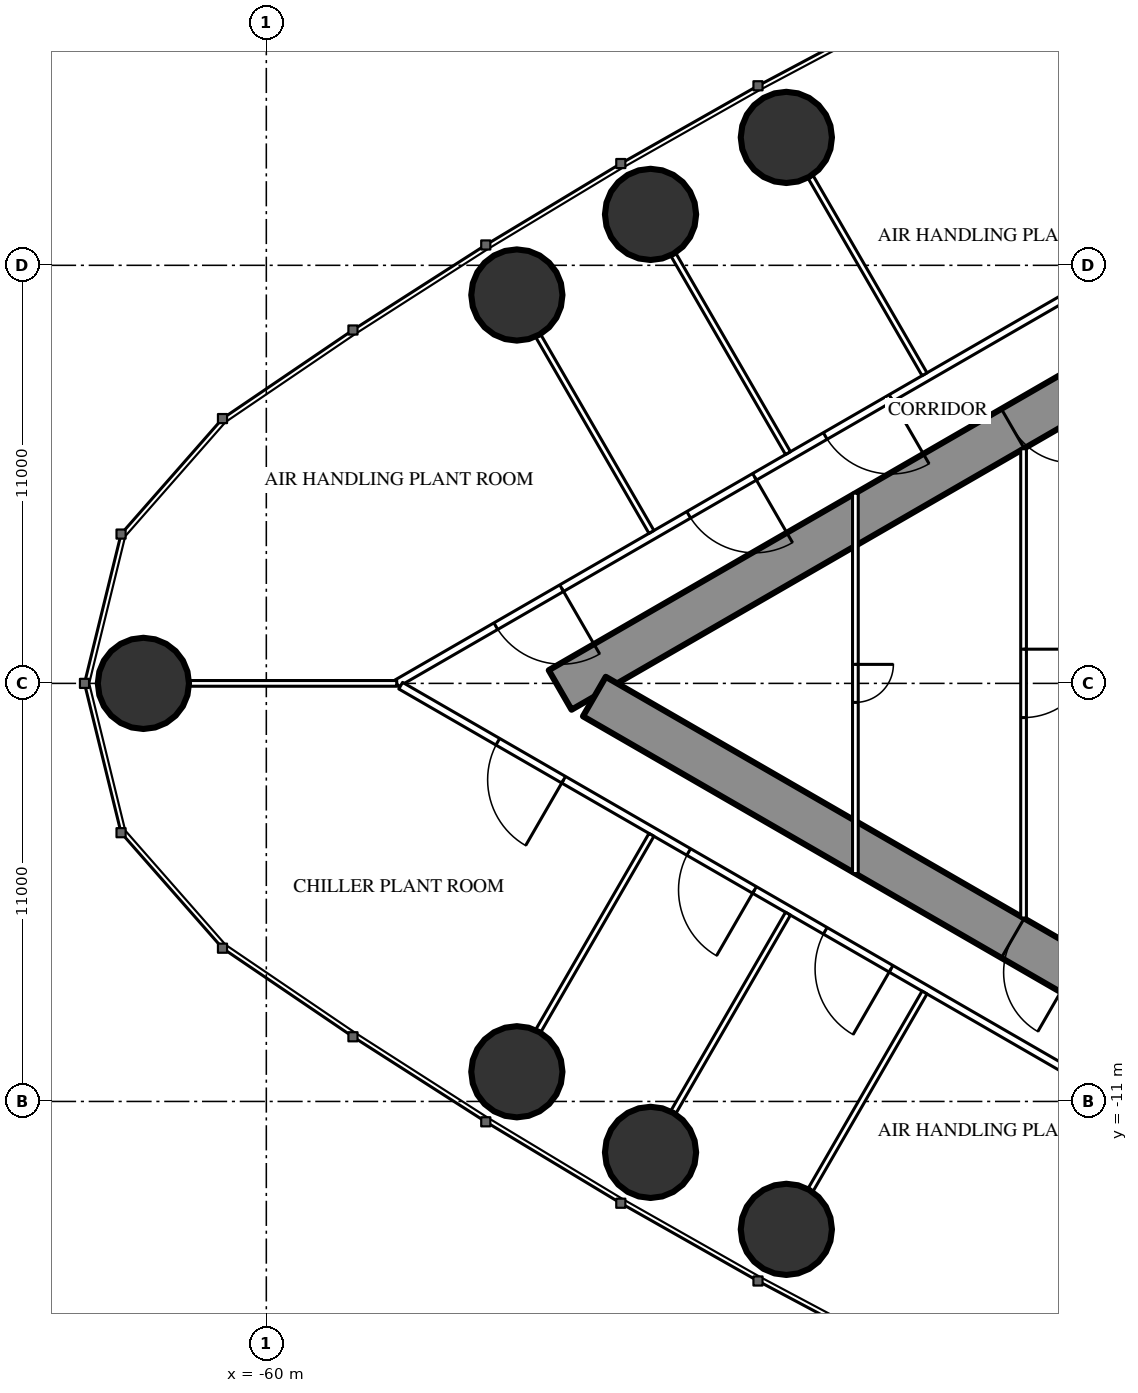
"""IFC4 building model, lengths in metres.
Left out: names, types, materials, properties, quantities, classifications, styles, units other than length and angle.
Written with IfcOpenShell. Run it as: python <this file> out.ifc"""

import sys

from ifc_helpers import new_model, si_unit, direction, frame, frame_2d, origin, origin_2d, place, context, subcontext, project, spatial, rectangle, circle, extrude, element, fill, save


model = new_model("IFC4")
c1 = context("Model", 3, precision=1e-05, world=origin(), true_north=direction((0.0, 1.0)))
c2 = subcontext(c1, "Body", "Model", "MODEL_VIEW")
j1 = project(units=[si_unit("LENGTHUNIT", "METRE"), si_unit("PLANEANGLEUNIT", "RADIAN")], contexts=[c1])
p1 = place(None, origin())
s1 = spatial("IfcSite", under=j1, at=p1, CompositionType="ELEMENT")
p2 = place(p1, origin())
s2 = spatial("IfcBuilding", under=s1, at=p2, CompositionType="ELEMENT")
p3 = place(p2, frame((0.0, 0.0, 263.3)))
s3 = spatial("IfcBuildingStorey", under=s2, at=p3, CompositionType="ELEMENT", Elevation=263.3)
for number, where, z_axis, x_axis in (
    (1, (-63.234, 0.0, 0.0), (0.0, 0.0, 1.0), (1.0, 0.0, 0.0)),
    (2, (-53.408, -10.219, 0.0), (0.0, 0.0, 1.0), (1.0, 0.0, 0.0)),
    (3, (-49.89, -12.34, 0.0), (0.0, 0.0, 1.0), (1.0, 0.0, 0.0)),
    (4, (-46.317, -14.365, 0.0), (0.0, 0.0, 1.0), (1.0, 0.0, 0.0)),
    (5, (-46.317, 14.365, 0.0), (0.0, 0.0, 1.0), (1.0, 0.0, 0.0)),
    (6, (-49.89, 12.34, 0.0), (0.0, 0.0, 1.0), (1.0, 0.0, 0.0)),
    (7, (-53.408, 10.219, 0.0), (0.0, 0.0, 1.0), (1.0, 0.0, 0.0)),
):
    element("IfcColumn", number, at=place(p3, frame(where, z_axis=z_axis, x_axis=x_axis)), inside=s3, PredefinedType="COLUMN", context=c2, shape_type="SweptSolid", body=[
        extrude(circle(Radius=1.2, at=origin_2d()), origin(), (0.0, 0.0, 1.0), 5.0),
    ])
p4 = place(p3, frame((-27.2, 14.3, 0.0), z_axis=(0.0, 0.0, 1.0), x_axis=(-0.866026593062, -0.499997940104, 0.0)))
e8 = element("IfcWall", 8, at=p4, inside=s3, PredefinedType="SHEAR", context=c2, shape_type="SweptSolid", body=[
    extrude(rectangle(XDim=28.946, YDim=1.2, at=frame_2d((14.473, 0.0))), origin(), (0.0, 0.0, 1.0), 5.0),
])
p5 = place(p4, frame((4.6, 0.0, 0.0)))
e9 = element("IfcOpeningElement", 9, at=p5, cuts=e8, PredefinedType="OPENING", context=c2, shape_type="SweptSolid", body=[
    extrude(rectangle(XDim=1.0, YDim=2.2, at=frame_2d((0.5, 1.1))), frame((0.0, 0.61, 0.0), z_axis=(0.0, -1.0, 0.0), x_axis=(1.0, 0.0, 0.0)), (0.0, 0.0, 1.0), 1.22),
])
p6 = place(p4, frame((13.395, 0.0, 0.0)))
e10 = element("IfcOpeningElement", 10, at=p6, cuts=e8, PredefinedType="OPENING", context=c2, shape_type="SweptSolid", body=[
    extrude(rectangle(XDim=1.8, YDim=2.2, at=frame_2d((0.9, 1.1))), frame((0.0, 0.61, 0.0), z_axis=(0.0, -1.0, 0.0), x_axis=(1.0, 0.0, 0.0)), (0.0, 0.0, 1.0), 1.22),
])
p7 = place(p3, frame((-27.2, -14.3, 0.0), z_axis=(0.0, 0.0, 1.0), x_axis=(-0.866024021859, 0.500002393557, 0.0)))
e11 = element("IfcWall", 11, at=p7, inside=s3, PredefinedType="SHEAR", context=c2, shape_type="SweptSolid", body=[
    extrude(rectangle(XDim=27.907, YDim=1.2, at=frame_2d((13.954, 0.0))), origin(), (0.0, 0.0, 1.0), 5.0),
])
p8 = place(p7, frame((4.6, 0.0, 0.0)))
e12 = element("IfcOpeningElement", 12, at=p8, cuts=e11, PredefinedType="OPENING", context=c2, shape_type="SweptSolid", body=[
    extrude(rectangle(XDim=1.0, YDim=2.2, at=frame_2d((0.5, 1.1))), frame((0.0, 0.61, 0.0), z_axis=(0.0, -1.0, 0.0), x_axis=(1.0, 0.0, 0.0)), (0.0, 0.0, 1.0), 1.22),
])
p9 = place(p7, frame((13.395, 0.0, 0.0)))
e13 = element("IfcOpeningElement", 13, at=p9, cuts=e11, PredefinedType="OPENING", context=c2, shape_type="SweptSolid", body=[
    extrude(rectangle(XDim=1.8, YDim=2.2, at=frame_2d((0.9, 1.1))), frame((0.0, 0.61, 0.0), z_axis=(0.0, -1.0, 0.0), x_axis=(1.0, 0.0, 0.0)), (0.0, 0.0, 1.0), 1.22),
])
p10 = place(p3, frame((-28.737, 16.068, 0.0), z_axis=(0.0, 0.0, 1.0), x_axis=(-0.866026057212, -0.499998868229, 0.0)))
e14 = element("IfcWall", 14, at=p10, inside=s3, PredefinedType="PARTITIONING", context=c2, shape_type="SweptSolid", body=[
    extrude(rectangle(XDim=32.137, YDim=0.2, at=frame_2d((16.068, 0.0))), origin(), (0.0, 0.0, 1.0), 4.75),
])
p11 = place(p10, frame((7.134, 0.0, 0.0)))
e15 = element("IfcOpeningElement", 15, at=p11, cuts=e14, PredefinedType="OPENING", context=c2, shape_type="SweptSolid", body=[
    extrude(rectangle(XDim=2.0, YDim=2.4, at=frame_2d((1.0, 1.2))), frame((0.0, 0.11, 0.0), z_axis=(0.0, -1.0, 0.0), x_axis=(1.0, 0.0, 0.0)), (0.0, 0.0, 1.0), 0.22),
])
p12 = place(p10, frame((17.117, 0.0, 0.0)))
e16 = element("IfcOpeningElement", 16, at=p12, cuts=e14, PredefinedType="OPENING", context=c2, shape_type="SweptSolid", body=[
    extrude(rectangle(XDim=2.0, YDim=2.4, at=frame_2d((1.0, 1.2))), frame((0.0, 0.11, 0.0), z_axis=(0.0, -1.0, 0.0), x_axis=(1.0, 0.0, 0.0)), (0.0, 0.0, 1.0), 0.22),
])
p13 = place(p10, frame((21.266, 0.0, 0.0)))
e17 = element("IfcOpeningElement", 17, at=p13, cuts=e14, PredefinedType="OPENING", context=c2, shape_type="SweptSolid", body=[
    extrude(rectangle(XDim=2.0, YDim=2.4, at=frame_2d((1.0, 1.2))), frame((0.0, 0.11, 0.0), z_axis=(0.0, -1.0, 0.0), x_axis=(1.0, 0.0, 0.0)), (0.0, 0.0, 1.0), 0.22),
])
p14 = place(p10, frame((27.126, 0.0, 0.0)))
e18 = element("IfcOpeningElement", 18, at=p14, cuts=e14, PredefinedType="OPENING", context=c2, shape_type="SweptSolid", body=[
    extrude(rectangle(XDim=2.0, YDim=2.4, at=frame_2d((1.0, 1.2))), frame((0.0, 0.11, 0.0), z_axis=(0.0, -1.0, 0.0), x_axis=(1.0, 0.0, 0.0)), (0.0, 0.0, 1.0), 0.22),
])
p15 = place(p3, frame((-28.737, -16.068, 0.0), z_axis=(0.0, 0.0, 1.0), x_axis=(-0.866026220747, 0.499998584977, 0.0)))
e19 = element("IfcWall", 19, at=p15, inside=s3, PredefinedType="PARTITIONING", context=c2, shape_type="SweptSolid", body=[
    extrude(rectangle(XDim=32.017, YDim=0.2, at=frame_2d((16.008, 0.0))), origin(), (0.0, 0.0, 1.0), 4.75),
])
p16 = place(p15, frame((27.066, 0.0, 0.0)))
e20 = element("IfcOpeningElement", 20, at=p16, cuts=e19, PredefinedType="OPENING", context=c2, shape_type="SweptSolid", body=[
    extrude(rectangle(XDim=2.0, YDim=2.4, at=frame_2d((1.0, 1.2))), frame((0.0, 0.11, 0.0), z_axis=(0.0, -1.0, 0.0), x_axis=(1.0, 0.0, 0.0)), (0.0, 0.0, 1.0), 0.22),
])
p17 = place(p15, frame((21.266, 0.0, 0.0)))
e21 = element("IfcOpeningElement", 21, at=p17, cuts=e19, PredefinedType="OPENING", context=c2, shape_type="SweptSolid", body=[
    extrude(rectangle(XDim=2.0, YDim=2.4, at=frame_2d((1.0, 1.2))), frame((0.0, 0.11, 0.0), z_axis=(0.0, -1.0, 0.0), x_axis=(1.0, 0.0, 0.0)), (0.0, 0.0, 1.0), 0.22),
])
p18 = place(p15, frame((17.117, 0.0, 0.0)))
e22 = element("IfcOpeningElement", 22, at=p18, cuts=e19, PredefinedType="OPENING", context=c2, shape_type="SweptSolid", body=[
    extrude(rectangle(XDim=2.0, YDim=2.4, at=frame_2d((1.0, 1.2))), frame((0.0, 0.11, 0.0), z_axis=(0.0, -1.0, 0.0), x_axis=(1.0, 0.0, 0.0)), (0.0, 0.0, 1.0), 0.22),
])
p19 = place(p15, frame((7.134, 0.0, 0.0)))
e23 = element("IfcOpeningElement", 23, at=p19, cuts=e19, PredefinedType="OPENING", context=c2, shape_type="SweptSolid", body=[
    extrude(rectangle(XDim=2.0, YDim=2.4, at=frame_2d((1.0, 1.2))), frame((0.0, 0.11, 0.0), z_axis=(0.0, -1.0, 0.0), x_axis=(1.0, 0.0, 0.0)), (0.0, 0.0, 1.0), 0.22),
])
p20 = place(p3, frame((-42.68, 8.134, 0.0), z_axis=(0.0, 0.0, 1.0), x_axis=(-0.499984479505, 0.866034364361, 0.0)))
e24 = element("IfcWall", 24, at=p20, inside=s3, PredefinedType="PARTITIONING", context=c2, shape_type="SweptSolid", body=[
    extrude(rectangle(XDim=5.995, YDim=0.15, at=frame_2d((2.998, 0.0))), origin(), (0.0, 0.0, 1.0), 3.85),
])
p21 = place(p3, frame((-46.274, 6.059, 0.0), z_axis=(0.0, 0.0, 1.0), x_axis=(-0.500020471368, 0.866013584312, 0.0)))
e25 = element("IfcWall", 25, at=p21, inside=s3, PredefinedType="PARTITIONING", context=c2, shape_type="SweptSolid", body=[
    extrude(rectangle(XDim=6.028, YDim=0.15, at=frame_2d((3.014, 0.0))), origin(), (0.0, 0.0, 1.0), 3.85),
])
p22 = place(p3, frame((-49.866, 3.985, 0.0), z_axis=(0.0, 0.0, 1.0), x_axis=(-0.500000694566, 0.866025002776, 0.0)))
e26 = element("IfcWall", 26, at=p22, inside=s3, PredefinedType="PARTITIONING", context=c2, shape_type="SweptSolid", body=[
    extrude(rectangle(XDim=5.95, YDim=0.15, at=frame_2d((2.975, 0.0))), origin(), (0.0, 0.0, 1.0), 3.85),
])
p23 = place(p3, frame((-42.68, -8.134, 0.0), z_axis=(0.0, 0.0, 1.0), x_axis=(-0.499984479505, -0.866034364361, 0.0)))
e27 = element("IfcWall", 27, at=p23, inside=s3, PredefinedType="PARTITIONING", context=c2, shape_type="SweptSolid", body=[
    extrude(rectangle(XDim=5.995, YDim=0.15, at=frame_2d((2.998, 0.0))), origin(), (0.0, 0.0, 1.0), 3.85),
])
p24 = place(p3, frame((-46.274, -6.059, 0.0), z_axis=(0.0, 0.0, 1.0), x_axis=(-0.500020471368, -0.866013584312, 0.0)))
e28 = element("IfcWall", 28, at=p24, inside=s3, PredefinedType="PARTITIONING", context=c2, shape_type="SweptSolid", body=[
    extrude(rectangle(XDim=6.028, YDim=0.15, at=frame_2d((3.014, 0.0))), origin(), (0.0, 0.0, 1.0), 3.85),
])
p25 = place(p3, frame((-49.866, -3.985, 0.0), z_axis=(0.0, 0.0, 1.0), x_axis=(-0.500000694566, -0.866025002776, 0.0)))
e29 = element("IfcWall", 29, at=p25, inside=s3, PredefinedType="PARTITIONING", context=c2, shape_type="SweptSolid", body=[
    extrude(rectangle(XDim=5.95, YDim=0.15, at=frame_2d((2.975, 0.0))), origin(), (0.0, 0.0, 1.0), 3.85),
])
p26 = place(p3, frame((-56.568, 0.0, 0.0), z_axis=(0.0, 0.0, 1.0), x_axis=(-1.0, 0.0, 0.0)))
e30 = element("IfcWall", 30, at=p26, inside=s3, PredefinedType="PARTITIONING", context=c2, shape_type="SweptSolid", body=[
    extrude(rectangle(XDim=5.446, YDim=0.15, at=frame_2d((2.723, 0.0))), origin(), (0.0, 0.0, 1.0), 3.85),
])
p27 = place(p3, frame((-40.075, 6.174, 0.0), z_axis=(0.0, 0.0, 1.0), x_axis=(0.0, -1.0, 0.0)))
e31 = element("IfcWall", 31, at=p27, inside=s3, PredefinedType="PARTITIONING", context=c2, shape_type="SweptSolid", body=[
    extrude(rectangle(XDim=12.348, YDim=0.15, at=frame_2d((6.174, 0.0))), origin(), (0.0, 0.0, 1.0), 4.75),
])
p28 = place(p27, frame((5.274, 0.0, 0.0)))
e32 = element("IfcOpeningElement", 32, at=p28, cuts=e31, PredefinedType="OPENING", context=c2, shape_type="SweptSolid", body=[
    extrude(rectangle(XDim=1.8, YDim=2.2, at=frame_2d((0.9, 1.1))), frame((0.0, 0.085, 0.0), z_axis=(0.0, -1.0, 0.0), x_axis=(1.0, 0.0, 0.0)), (0.0, 0.0, 1.0), 0.17),
])
p29 = place(p3, frame((-44.5, 5.005, 0.0), z_axis=(0.0, 0.0, 1.0), x_axis=(0.0, -1.0, 0.0)))
e33 = element("IfcWall", 33, at=p29, inside=s3, PredefinedType="PARTITIONING", context=c2, shape_type="SweptSolid", body=[
    extrude(rectangle(XDim=10.009, YDim=0.15, at=frame_2d((5.005, 0.0))), origin(), (0.0, 0.0, 1.0), 3.9),
])
p30 = place(p29, frame((4.505, 0.0, 0.0)))
e34 = element("IfcOpeningElement", 34, at=p30, cuts=e33, PredefinedType="OPENING", context=c2, shape_type="SweptSolid", body=[
    extrude(rectangle(XDim=1.0, YDim=2.2, at=frame_2d((0.5, 1.1))), frame((0.0, 0.085, 0.0), z_axis=(0.0, -1.0, 0.0), x_axis=(1.0, 0.0, 0.0)), (0.0, 0.0, 1.0), 0.17),
])
p31 = place(p12, origin())
e35 = element("IfcDoor", 35, at=p31, inside=s3, OperationType="DOUBLE_DOOR_SINGLE_SWING", PredefinedType="DOOR", context=c2, shape_type="SweptSolid", body=[
    extrude(rectangle(XDim=2.0, YDim=2.4, at=frame_2d((1.0, 1.2))), frame((0.0, 0.025, 0.0), z_axis=(0.0, -1.0, 0.0), x_axis=(1.0, 0.0, 0.0)), (0.0, 0.0, 1.0), 0.05),
])
fill(e16, e35)
p32 = place(p13, origin())
e36 = element("IfcDoor", 36, at=p32, inside=s3, OperationType="DOUBLE_DOOR_SINGLE_SWING", PredefinedType="DOOR", context=c2, shape_type="SweptSolid", body=[
    extrude(rectangle(XDim=2.0, YDim=2.4, at=frame_2d((1.0, 1.2))), frame((0.0, 0.025, 0.0), z_axis=(0.0, -1.0, 0.0), x_axis=(1.0, 0.0, 0.0)), (0.0, 0.0, 1.0), 0.05),
])
fill(e17, e36)
p33 = place(p14, origin())
e37 = element("IfcDoor", 37, at=p33, inside=s3, OperationType="DOUBLE_DOOR_SINGLE_SWING", PredefinedType="DOOR", context=c2, shape_type="SweptSolid", body=[
    extrude(rectangle(XDim=2.0, YDim=2.4, at=frame_2d((1.0, 1.2))), frame((0.0, 0.025, 0.0), z_axis=(0.0, -1.0, 0.0), x_axis=(1.0, 0.0, 0.0)), (0.0, 0.0, 1.0), 0.05),
])
fill(e18, e37)
p34 = place(p16, origin())
e38 = element("IfcDoor", 38, at=p34, inside=s3, OperationType="DOUBLE_DOOR_SINGLE_SWING", PredefinedType="DOOR", context=c2, shape_type="SweptSolid", body=[
    extrude(rectangle(XDim=2.0, YDim=2.4, at=frame_2d((1.0, 1.2))), frame((0.0, 0.025, 0.0), z_axis=(0.0, -1.0, 0.0), x_axis=(1.0, 0.0, 0.0)), (0.0, 0.0, 1.0), 0.05),
])
fill(e20, e38)
p35 = place(p17, origin())
e39 = element("IfcDoor", 39, at=p35, inside=s3, OperationType="DOUBLE_DOOR_SINGLE_SWING", PredefinedType="DOOR", context=c2, shape_type="SweptSolid", body=[
    extrude(rectangle(XDim=2.0, YDim=2.4, at=frame_2d((1.0, 1.2))), frame((0.0, 0.025, 0.0), z_axis=(0.0, -1.0, 0.0), x_axis=(1.0, 0.0, 0.0)), (0.0, 0.0, 1.0), 0.05),
])
fill(e21, e39)
p36 = place(p18, origin())
e40 = element("IfcDoor", 40, at=p36, inside=s3, OperationType="DOUBLE_DOOR_SINGLE_SWING", PredefinedType="DOOR", context=c2, shape_type="SweptSolid", body=[
    extrude(rectangle(XDim=2.0, YDim=2.4, at=frame_2d((1.0, 1.2))), frame((0.0, 0.025, 0.0), z_axis=(0.0, -1.0, 0.0), x_axis=(1.0, 0.0, 0.0)), (0.0, 0.0, 1.0), 0.05),
])
fill(e22, e40)
p37 = place(p28, origin())
e41 = element("IfcDoor", 41, at=p37, inside=s3, OperationType="DOUBLE_DOOR_SINGLE_SWING", PredefinedType="DOOR", context=c2, shape_type="SweptSolid", body=[
    extrude(rectangle(XDim=1.8, YDim=2.2, at=frame_2d((0.9, 1.1))), frame((0.0, 0.025, 0.0), z_axis=(0.0, -1.0, 0.0), x_axis=(1.0, 0.0, 0.0)), (0.0, 0.0, 1.0), 0.05),
])
fill(e32, e41)
p38 = place(p30, origin())
e42 = element("IfcDoor", 42, at=p38, inside=s3, OperationType="SINGLE_SWING_LEFT", PredefinedType="DOOR", context=c2, shape_type="SweptSolid", body=[
    extrude(rectangle(XDim=1.0, YDim=2.2, at=frame_2d((0.5, 1.1))), frame((0.0, 0.025, 0.0), z_axis=(0.0, -1.0, 0.0), x_axis=(1.0, 0.0, 0.0)), (0.0, 0.0, 1.0), 0.05),
])
fill(e34, e42)
p39 = place(p6, origin())
e43 = element("IfcDoor", 43, at=p39, inside=s3, OperationType="DOUBLE_DOOR_SINGLE_SWING", PredefinedType="DOOR", context=c2, shape_type="SweptSolid", body=[
    extrude(rectangle(XDim=1.8, YDim=2.2, at=frame_2d((0.9, 1.1))), frame((0.0, 0.025, 0.0), z_axis=(0.0, -1.0, 0.0), x_axis=(1.0, 0.0, 0.0)), (0.0, 0.0, 1.0), 0.05),
])
fill(e10, e43)
p40 = place(p9, origin())
e44 = element("IfcDoor", 44, at=p40, inside=s3, OperationType="DOUBLE_DOOR_SINGLE_SWING", PredefinedType="DOOR", context=c2, shape_type="SweptSolid", body=[
    extrude(rectangle(XDim=1.8, YDim=2.2, at=frame_2d((0.9, 1.1))), frame((0.0, 0.025, 0.0), z_axis=(0.0, -1.0, 0.0), x_axis=(1.0, 0.0, 0.0)), (0.0, 0.0, 1.0), 0.05),
])
fill(e13, e44)
save(model, sys.argv[1])
